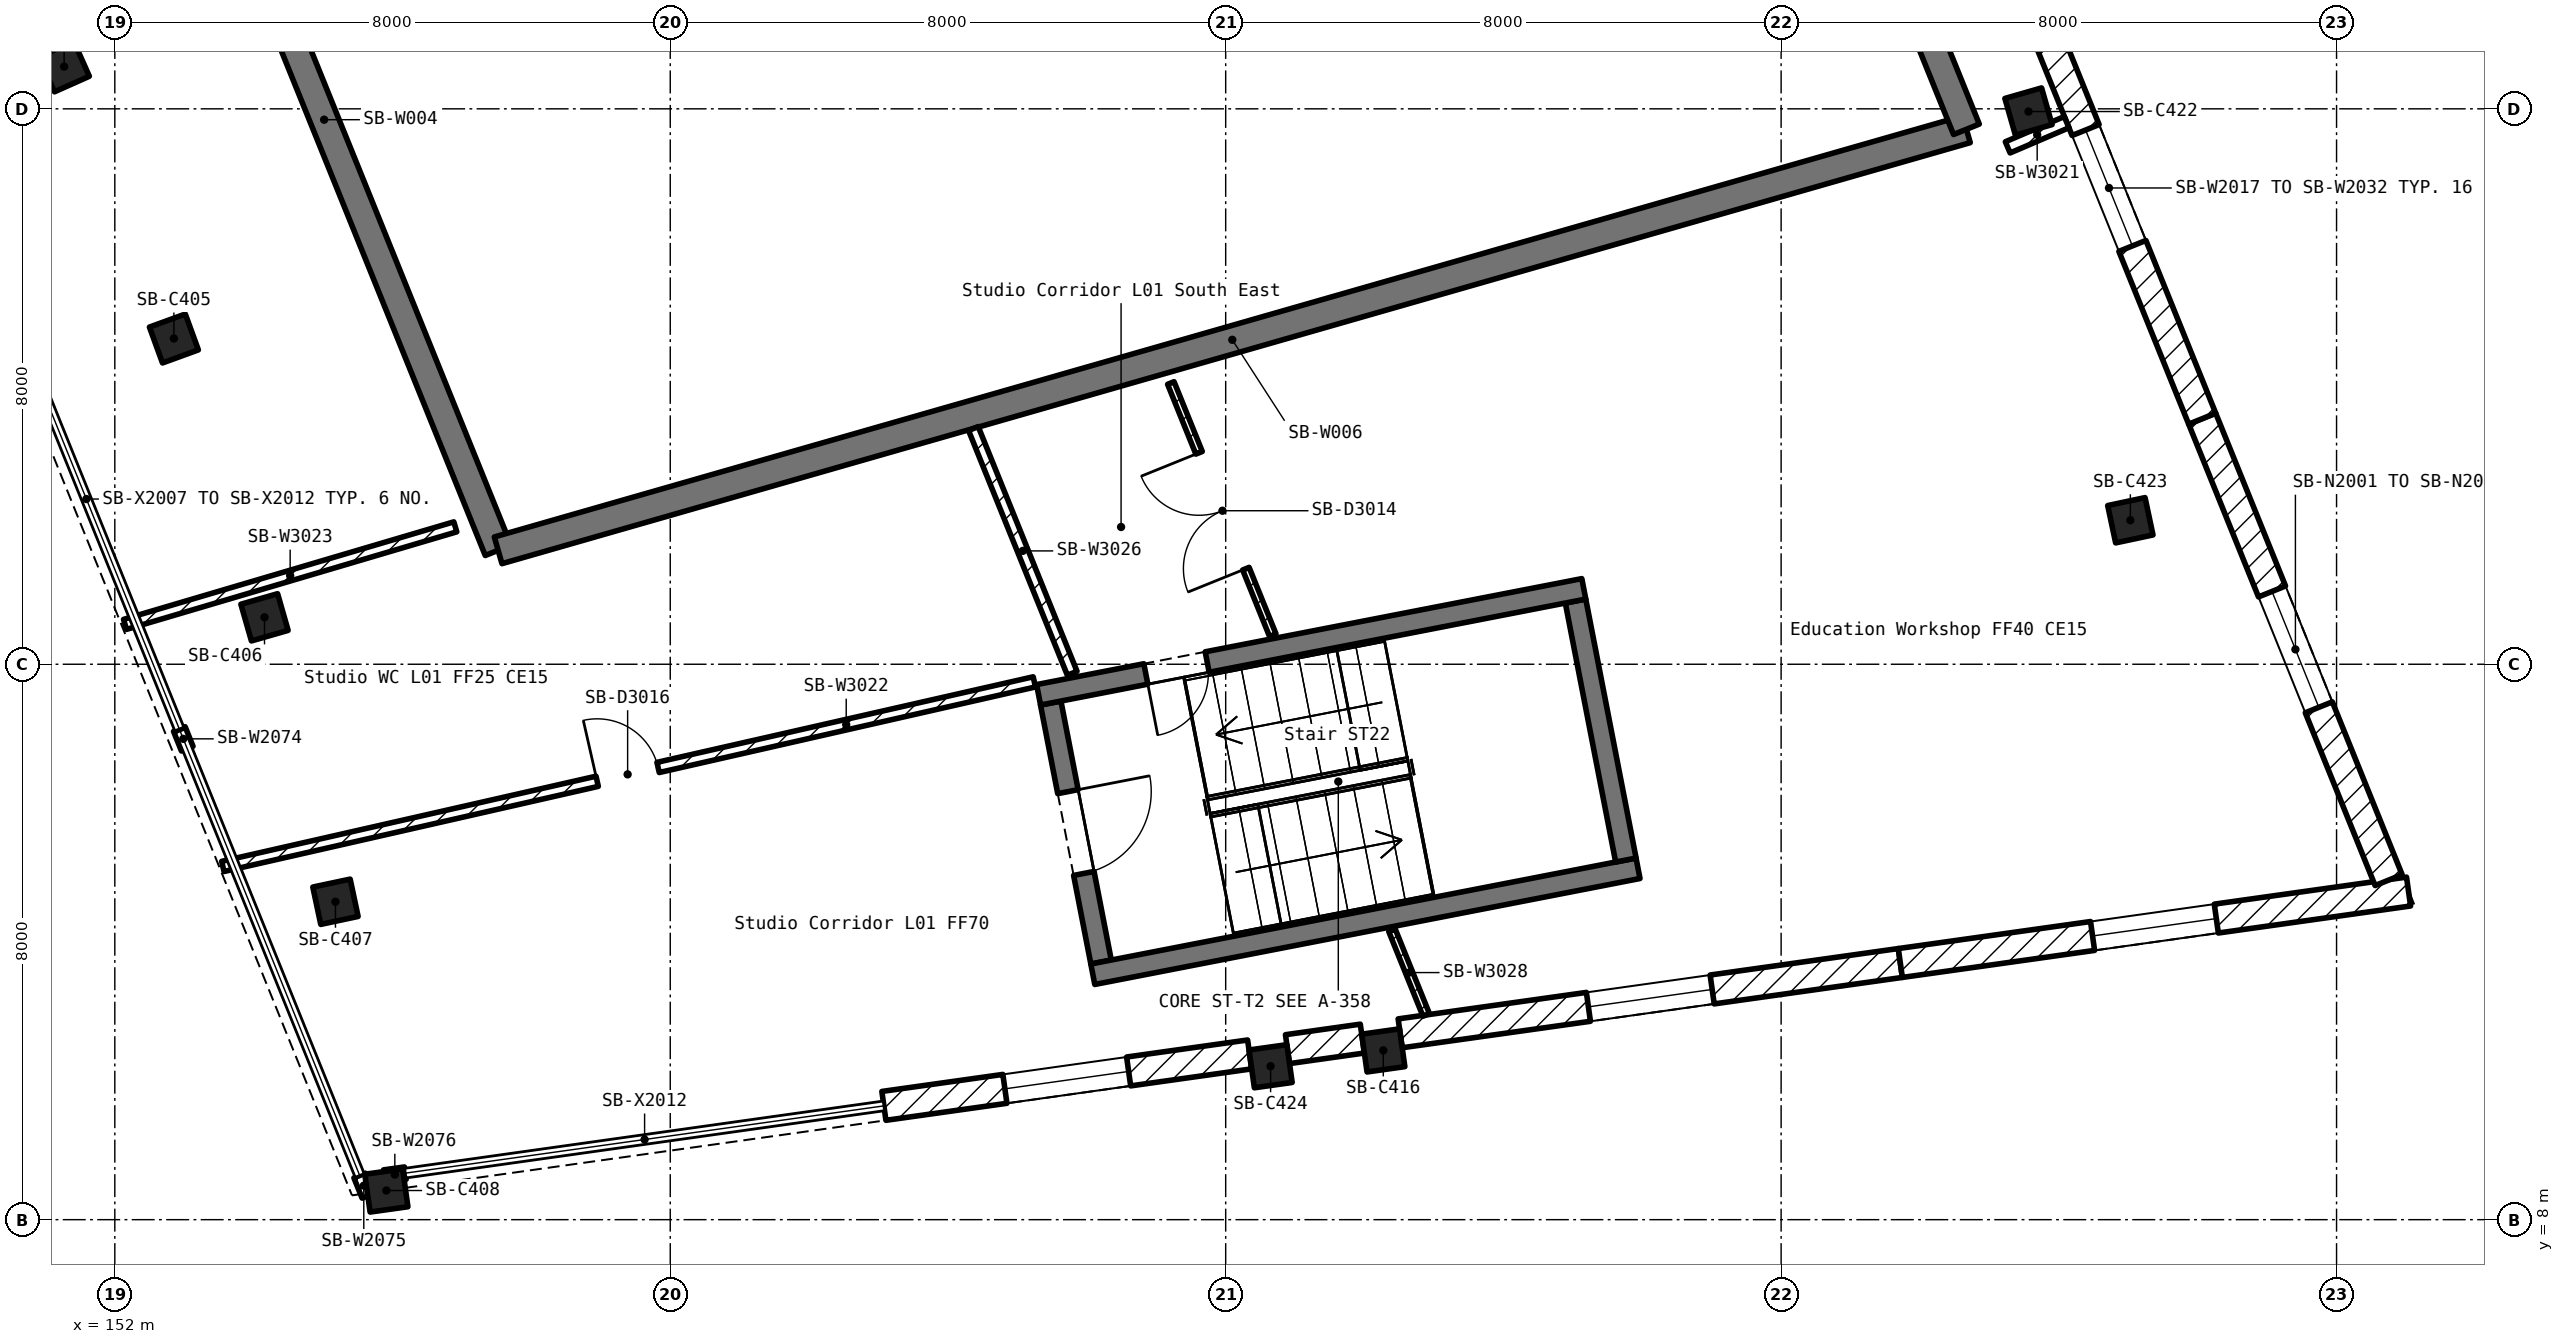
"""IFC4 building model, lengths in metres.
Left out: names, types, materials, properties, quantities, classifications, styles, units other than length and angle.
Written with IfcOpenShell. Run it as: python <this file> out.ifc"""

import sys

from ifc_helpers import new_model, si_unit, direction, frame, frame_2d, origin, origin_2d, place, context, subcontext, project, spatial, rectangle, extrude, element, fill, save


model = new_model("IFC4")
c1 = context("Model", 3, precision=1e-05, world=origin(), true_north=direction((0.0, 1.0)))
c2 = subcontext(c1, "Body", "Model", "MODEL_VIEW")
j1 = project(units=[si_unit("LENGTHUNIT", "METRE"), si_unit("PLANEANGLEUNIT", "RADIAN")], contexts=[c1])
p1 = place(None, origin())
s1 = spatial("IfcSite", under=j1, at=p1, CompositionType="ELEMENT")
p2 = place(p1, origin())
s2 = spatial("IfcBuilding", under=s1, at=p2, CompositionType="ELEMENT")
p3 = place(p2, frame((0.0, 0.0, 6.0)))
s3 = spatial("IfcBuildingStorey", under=s2, at=p3, CompositionType="ELEMENT", Elevation=6.0)
for number, where, z_axis, x_axis in (
    (1, (151.27, 24.608, 0.0), (0.0, 0.0, 1.0), (0.407, -0.914, 0.0)),
    (2, (152.851, 20.692, 0.0), (0.0, 0.0, 1.0), (0.342, -0.94, 0.0)),
    (3, (154.156, 16.676, 0.0), (0.0, 0.0, 1.0), (0.276, -0.961, 0.0)),
    (4, (155.178, 12.579, 0.0), (0.0, 0.0, 1.0), (0.208, -0.978, 0.0)),
    (5, (155.911, 8.42, 0.0), (0.0, 0.0, 1.0), (0.139, -0.99, 0.0)),
    (6, (170.27, 10.438, 0.0), (0.0, 0.0, 1.0), (0.139, -0.99, 0.0)),
    (7, (179.563, 23.961, 0.0), (0.0, 0.0, 1.0), (0.276, -0.961, 0.0)),
    (8, (181.03, 18.074, 0.0), (0.0, 0.0, 1.0), (0.208, -0.978, 0.0)),
    (9, (168.647, 10.21, 0.0), (0.0, 0.0, 1.0), (0.139, -0.99, 0.0)),
):
    element("IfcColumn", number, at=place(p3, frame(where, z_axis=z_axis, x_axis=x_axis)), inside=s3, PredefinedType="COLUMN", context=c2, shape_type="SweptSolid", body=[
        extrude(rectangle(XDim=0.55, YDim=0.55, at=origin_2d()), origin(), (0.0, 0.0, 1.0), 5.5),
    ])
p4 = place(p3, frame((152.509, 30.046, 0.0), z_axis=(0.0, 0.0, 1.0), x_axis=(0.374613299166, -0.92718114524, 0.0)))
e10 = element("IfcWall", 10, at=p4, inside=s3, PredefinedType="SHEAR", context=c2, shape_type="SweptSolid", body=[
    extrude(rectangle(XDim=13.379, YDim=0.4, at=frame_2d((6.689, 0.0))), origin(), (0.0, 0.0, 1.0), 5.5),
])
p5 = place(p3, frame((157.521, 17.641, 0.0), z_axis=(0.0, 0.0, 1.0), x_axis=(0.961263044958, 0.275632651182, 0.0)))
e11 = element("IfcWall", 11, at=p5, inside=s3, PredefinedType="SHEAR", context=c2, shape_type="SweptSolid", body=[
    extrude(rectangle(XDim=22.0, YDim=0.4, at=frame_2d((11.0, 0.0))), origin(), (0.0, 0.0, 1.0), 5.5),
])
p6 = place(p3, frame((178.669, 23.705, 0.0), z_axis=(0.0, 0.0, 1.0), x_axis=(-0.374642655757, 0.92716928362, 0.0)))
e12 = element("IfcWall", 12, at=p6, inside=s3, PredefinedType="SHEAR", context=c2, shape_type="SweptSolid", body=[
    extrude(rectangle(XDim=17.979, YDim=0.4, at=frame_2d((8.99, 0.0))), origin(), (0.0, 0.0, 1.0), 5.5),
])
p7 = place(p3, frame((163.077, 9.639, 0.0), z_axis=(0.0, 0.0, 1.0), x_axis=(0.990252820999, 0.139281551197, 0.0)))
e13 = element("IfcWall", 13, at=p7, inside=s3, PredefinedType="SOLIDWALL", context=c2, shape_type="SweptSolid", body=[
    extrude(rectangle(XDim=5.32, YDim=0.42, at=frame_2d((2.66, 0.0))), origin(), (0.0, 0.0, 1.0), 4.48),
])
p8 = place(p7, frame((1.76, 0.0, 1.0)))
e14 = element("IfcOpeningElement", 14, at=p8, cuts=e13, PredefinedType="OPENING", context=c2, shape_type="SweptSolid", body=[
    extrude(rectangle(XDim=1.8, YDim=1.5, at=frame_2d((0.9, 0.75))), frame((0.0, 0.222, 0.0), z_axis=(0.0, -1.0, 0.0), x_axis=(1.0, 0.0, 0.0)), (0.0, 0.0, 1.0), 0.444),
])
p9 = place(p3, frame((168.89, 10.456, 0.0), z_axis=(0.0, 0.0, 1.0), x_axis=(0.990225632743, 0.139474715481, 0.0)))
e15 = element("IfcWall", 15, at=p9, inside=s3, PredefinedType="SOLIDWALL", context=c2, shape_type="SweptSolid", body=[
    extrude(rectangle(XDim=1.089, YDim=0.42, at=frame_2d((0.544, 0.0))), origin(), (0.0, 0.0, 1.0), 4.48),
])
p10 = place(p3, frame((170.513, 10.684, 0.0), z_axis=(0.0, 0.0, 1.0), x_axis=(0.990259181758, 0.139236320493, 0.0)))
e16 = element("IfcWall", 16, at=p10, inside=s3, PredefinedType="SOLIDWALL", context=c2, shape_type="SweptSolid", body=[
    extrude(rectangle(XDim=7.275, YDim=0.42, at=frame_2d((3.637, 0.0))), origin(), (0.0, 0.0, 1.0), 5.28),
])
p11 = place(p10, frame((2.738, 0.0, 1.0)))
e17 = element("IfcOpeningElement", 17, at=p11, cuts=e16, PredefinedType="OPENING", context=c2, shape_type="SweptSolid", body=[
    extrude(rectangle(XDim=1.8, YDim=1.5, at=frame_2d((0.9, 0.75))), frame((0.0, 0.222, 0.0), z_axis=(0.0, -1.0, 0.0), x_axis=(1.0, 0.0, 0.0)), (0.0, 0.0, 1.0), 0.444),
])
p12 = place(p3, frame((177.717, 11.697, 0.0), z_axis=(0.0, 0.0, 1.0), x_axis=(0.990262769028, 0.139210805171, 0.0)))
e18 = element("IfcWall", 18, at=p12, inside=s3, PredefinedType="SOLIDWALL", context=c2, shape_type="SweptSolid", body=[
    extrude(rectangle(XDim=7.392, YDim=0.42, at=frame_2d((3.696, 0.0))), origin(), (0.0, 0.0, 1.0), 5.28),
])
p13 = place(p12, frame((2.796, 0.0, 1.0)))
e19 = element("IfcOpeningElement", 19, at=p13, cuts=e18, PredefinedType="OPENING", context=c2, shape_type="SweptSolid", body=[
    extrude(rectangle(XDim=1.8, YDim=1.5, at=frame_2d((0.9, 0.75))), frame((0.0, 0.222, 0.0), z_axis=(0.0, -1.0, 0.0), x_axis=(1.0, 0.0, 0.0)), (0.0, 0.0, 1.0), 0.444),
])
p14 = place(p3, frame((184.75, 12.891, 0.0), z_axis=(0.0, 0.0, 1.0), x_axis=(-0.374594824941, 0.927188609252, 0.0)))
e20 = element("IfcWall", 20, at=p14, inside=s3, PredefinedType="SOLIDWALL", context=c2, shape_type="SweptSolid", body=[
    extrude(rectangle(XDim=7.168, YDim=0.42, at=frame_2d((3.584, 0.0))), origin(), (0.0, 0.0, 1.0), 5.28),
])
p15 = place(p14, frame((2.684, 0.0, 1.0)))
e21 = element("IfcOpeningElement", 21, at=p15, cuts=e20, PredefinedType="OPENING", context=c2, shape_type="SweptSolid", body=[
    extrude(rectangle(XDim=1.8, YDim=1.5, at=frame_2d((0.9, 0.75))), frame((0.0, 0.222, 0.0), z_axis=(0.0, -1.0, 0.0), x_axis=(1.0, 0.0, 0.0)), (0.0, 0.0, 1.0), 0.444),
])
p16 = place(p3, frame((182.065, 19.537, 0.0), z_axis=(0.0, 0.0, 1.0), x_axis=(-0.374594824941, 0.927188609252, 0.0)))
e22 = element("IfcWall", 22, at=p16, inside=s3, PredefinedType="SOLIDWALL", context=c2, shape_type="SweptSolid", body=[
    extrude(rectangle(XDim=7.168, YDim=0.42, at=frame_2d((3.584, 0.0))), origin(), (0.0, 0.0, 1.0), 5.28),
])
p17 = place(p16, frame((2.684, 0.0, 1.0)))
e23 = element("IfcOpeningElement", 23, at=p17, cuts=e22, PredefinedType="OPENING", context=c2, shape_type="SweptSolid", body=[
    extrude(rectangle(XDim=1.8, YDim=1.5, at=frame_2d((0.9, 0.75))), frame((0.0, 0.222, 0.0), z_axis=(0.0, -1.0, 0.0), x_axis=(1.0, 0.0, 0.0)), (0.0, 0.0, 1.0), 0.444),
])
p18 = place(p3, frame((165.48, 15.441, 0.0), z_axis=(0.0, 0.0, 1.0), x_axis=(0.190824946063, -0.981624082814, 0.0)))
e24 = element("IfcWall", 24, at=p18, inside=s3, PredefinedType="SOLIDWALL", context=c2, shape_type="SweptSolid", body=[
    extrude(rectangle(XDim=3.8, YDim=0.3, at=frame_2d((1.9, 0.0))), origin(), (0.0, 0.0, 1.0), 5.5),
])
p19 = place(p18, frame((1.3, 0.0, 0.0)))
e25 = element("IfcOpeningElement", 25, at=p19, cuts=e24, PredefinedType="OPENING", context=c2, shape_type="SweptSolid", body=[
    extrude(rectangle(XDim=1.2, YDim=2.1, at=frame_2d((0.6, 1.05))), frame((0.0, 0.162, 0.0), z_axis=(0.0, -1.0, 0.0), x_axis=(1.0, 0.0, 0.0)), (0.0, 0.0, 1.0), 0.324),
])
p20 = place(p3, frame((166.086, 11.535, 0.0), z_axis=(0.0, 0.0, 1.0), x_axis=(0.981635396686, 0.190766737073, 0.0)))
e26 = element("IfcWall", 26, at=p20, inside=s3, PredefinedType="SOLIDWALL", context=c2, shape_type="SweptSolid", body=[
    extrude(rectangle(XDim=8.0, YDim=0.3, at=frame_2d((4.0, 0.0))), origin(), (0.0, 0.0, 1.0), 5.5),
])
p21 = place(p3, frame((173.764, 13.18, 0.0), z_axis=(0.0, 0.0, 1.0), x_axis=(-0.190763033741, 0.981636116368, 0.0)))
e27 = element("IfcWall", 27, at=p21, inside=s3, PredefinedType="SOLIDWALL", context=c2, shape_type="SweptSolid", body=[
    extrude(rectangle(XDim=3.8, YDim=0.3, at=frame_2d((1.9, 0.0))), origin(), (0.0, 0.0, 1.0), 5.5),
])
p22 = place(p3, frame((173.158, 17.086, 0.0), z_axis=(0.0, 0.0, 1.0), x_axis=(-0.981641111144, -0.190737329623, 0.0)))
e28 = element("IfcWall", 28, at=p22, inside=s3, PredefinedType="SOLIDWALL", context=c2, shape_type="SweptSolid", body=[
    extrude(rectangle(XDim=8.0, YDim=0.3, at=frame_2d((4.0, 0.0))), origin(), (0.0, 0.0, 1.0), 5.5),
])
p23 = place(p22, frame((5.526, 0.0, 0.0)))
e29 = element("IfcOpeningElement", 29, at=p23, cuts=e28, PredefinedType="OPENING", context=c2, shape_type="SweptSolid", body=[
    extrude(rectangle(XDim=0.9, YDim=2.1, at=frame_2d((0.45, 1.05))), frame((0.0, 0.162, 0.0), z_axis=(0.0, -1.0, 0.0), x_axis=(1.0, 0.0, 0.0)), (0.0, 0.0, 1.0), 0.324),
])
p24 = place(p3, frame((180.112, 23.808, 0.0), z_axis=(0.0, 0.0, 1.0), x_axis=(-0.919322876767, -0.393504063832, 0.0)))
e30 = element("IfcWall", 30, at=p24, inside=s3, PredefinedType="PARTITIONING", context=c2, shape_type="SweptSolid", body=[
    extrude(rectangle(XDim=0.923, YDim=0.175, at=frame_2d((0.461, 0.0))), origin(), (0.0, 0.0, 1.0), 4.38),
])
p25 = place(p3, frame((153.556, 13.088, 0.0), z_axis=(0.0, 0.0, 1.0), x_axis=(0.975099631728, 0.221767238799, 0.0)))
e31 = element("IfcWall", 31, at=p25, inside=s3, PredefinedType="PARTITIONING", context=c2, shape_type="SweptSolid", body=[
    extrude(rectangle(XDim=11.987, YDim=0.15, at=frame_2d((5.993, 0.0))), origin(), (0.0, 0.0, 1.0), 4.38),
])
p26 = place(p25, frame((5.529, 0.0, 0.0)))
e32 = element("IfcOpeningElement", 32, at=p26, cuts=e31, PredefinedType="OPENING", context=c2, shape_type="SweptSolid", body=[
    extrude(rectangle(XDim=0.9, YDim=2.1, at=frame_2d((0.45, 1.05))), frame((0.0, 0.087, 0.0), z_axis=(0.0, -1.0, 0.0), x_axis=(1.0, 0.0, 0.0)), (0.0, 0.0, 1.0), 0.174),
])
p27 = place(p3, frame((156.904, 17.979, 0.0), z_axis=(0.0, 0.0, 1.0), x_axis=(-0.959043541429, -0.283258690322, 0.0)))
e33 = element("IfcWall", 33, at=p27, inside=s3, PredefinedType="PARTITIONING", context=c2, shape_type="SweptSolid", body=[
    extrude(rectangle(XDim=4.96, YDim=0.15, at=frame_2d((2.48, 0.0))), origin(), (0.0, 0.0, 1.0), 4.38),
])
p28 = place(p3, frame((165.789, 15.87, 0.0), z_axis=(0.0, 0.0, 1.0), x_axis=(-0.374367475924, 0.927280428441, 0.0)))
e34 = element("IfcWall", 34, at=p28, inside=s3, PredefinedType="PARTITIONING", context=c2, shape_type="SweptSolid", body=[
    extrude(rectangle(XDim=3.801, YDim=0.15, at=frame_2d((1.901, 0.0))), origin(), (0.0, 0.0, 1.0), 4.38),
])
p29 = place(p3, frame((168.678, 16.419, 0.0), z_axis=(0.0, 0.0, 1.0), x_axis=(-0.374729910149, 0.927134021833, 0.0)))
e35 = element("IfcWall", 35, at=p29, inside=s3, PredefinedType="PARTITIONING", context=c2, shape_type="SweptSolid", body=[
    extrude(rectangle(XDim=3.917, YDim=0.1, at=frame_2d((1.959, 0.0))), origin(), (0.0, 0.0, 1.0), 4.38),
])
p30 = place(p29, frame((1.033, 0.0, 0.0)))
e36 = element("IfcOpeningElement", 36, at=p30, cuts=e35, PredefinedType="OPENING", context=c2, shape_type="SweptSolid", body=[
    extrude(rectangle(XDim=1.8, YDim=2.1, at=frame_2d((0.9, 1.05))), frame((0.0, 0.062, 0.0), z_axis=(0.0, -1.0, 0.0), x_axis=(1.0, 0.0, 0.0)), (0.0, 0.0, 1.0), 0.124),
])
p31 = place(p3, frame((170.888, 10.949, 0.0), z_axis=(0.0, 0.0, 1.0), x_axis=(-0.374619505571, 0.927178637613, 0.0)))
e37 = element("IfcWall", 37, at=p31, inside=s3, PredefinedType="PARTITIONING", context=c2, shape_type="SweptSolid", body=[
    extrude(rectangle(XDim=1.316, YDim=0.1, at=frame_2d((0.658, 0.0))), origin(), (0.0, 0.0, 1.0), 4.38),
])
p32 = place(p3, frame((152.929, 15.067, 0.0), z_axis=(0.0, 0.0, 1.0), x_axis=(0.373735167079, -0.927535457483, 0.0)))
e38 = element("IfcWall", 38, at=p32, inside=s3, PredefinedType="SOLIDWALL", context=c2, shape_type="SweptSolid", body=[
    extrude(rectangle(XDim=0.305, YDim=0.18, at=frame_2d((0.153, 0.0))), origin(), (0.0, 0.0, 1.0), 4.43),
])
p33 = place(p3, frame((155.527, 8.636, 0.0), z_axis=(0.0, 0.0, 1.0), x_axis=(0.374463049601, -0.927241837108, 0.0)))
e39 = element("IfcWall", 39, at=p33, inside=s3, PredefinedType="SOLIDWALL", context=c2, shape_type="SweptSolid", body=[
    extrude(rectangle(XDim=0.315, YDim=0.18, at=frame_2d((0.157, 0.0))), origin(), (0.0, 0.0, 1.0), 4.43),
])
p34 = place(p3, frame((156.184, 8.67, 0.0), z_axis=(0.0, 0.0, 1.0), x_axis=(-0.99047104668, -0.137721115626, 0.0)))
e40 = element("IfcWall", 40, at=p34, inside=s3, PredefinedType="SOLIDWALL", context=c2, shape_type="SweptSolid", body=[
    extrude(rectangle(XDim=0.305, YDim=0.18, at=frame_2d((0.152, 0.0))), origin(), (0.0, 0.0, 1.0), 3.63),
])
p35 = place(p8, origin())
e41 = element("IfcWindow", 41, at=p35, inside=s3, PartitioningType="DOUBLE_PANEL_VERTICAL", PredefinedType="WINDOW", context=c2, shape_type="SweptSolid", body=[
    extrude(rectangle(XDim=1.8, YDim=1.5, at=frame_2d((0.9, 0.75))), frame((0.0, 0.03, 0.0), z_axis=(0.0, -1.0, 0.0), x_axis=(1.0, 0.0, 0.0)), (0.0, 0.0, 1.0), 0.06),
])
fill(e14, e41)
p36 = place(p11, origin())
e42 = element("IfcWindow", 42, at=p36, inside=s3, PartitioningType="DOUBLE_PANEL_VERTICAL", PredefinedType="WINDOW", context=c2, shape_type="SweptSolid", body=[
    extrude(rectangle(XDim=1.8, YDim=1.5, at=frame_2d((0.9, 0.75))), frame((0.0, 0.03, 0.0), z_axis=(0.0, -1.0, 0.0), x_axis=(1.0, 0.0, 0.0)), (0.0, 0.0, 1.0), 0.06),
])
fill(e17, e42)
p37 = place(p13, origin())
e43 = element("IfcWindow", 43, at=p37, inside=s3, PartitioningType="DOUBLE_PANEL_VERTICAL", PredefinedType="WINDOW", context=c2, shape_type="SweptSolid", body=[
    extrude(rectangle(XDim=1.8, YDim=1.5, at=frame_2d((0.9, 0.75))), frame((0.0, 0.03, 0.0), z_axis=(0.0, -1.0, 0.0), x_axis=(1.0, 0.0, 0.0)), (0.0, 0.0, 1.0), 0.06),
])
fill(e19, e43)
p38 = place(p15, origin())
e44 = element("IfcWindow", 44, at=p38, inside=s3, PartitioningType="DOUBLE_PANEL_VERTICAL", PredefinedType="WINDOW", context=c2, shape_type="SweptSolid", body=[
    extrude(rectangle(XDim=1.8, YDim=1.5, at=frame_2d((0.9, 0.75))), frame((0.0, 0.03, 0.0), z_axis=(0.0, -1.0, 0.0), x_axis=(1.0, 0.0, 0.0)), (0.0, 0.0, 1.0), 0.06),
])
fill(e21, e44)
p39 = place(p17, origin())
e45 = element("IfcWindow", 45, at=p39, inside=s3, PartitioningType="DOUBLE_PANEL_VERTICAL", PredefinedType="WINDOW", context=c2, shape_type="SweptSolid", body=[
    extrude(rectangle(XDim=1.8, YDim=1.5, at=frame_2d((0.9, 0.75))), frame((0.0, 0.03, 0.0), z_axis=(0.0, -1.0, 0.0), x_axis=(1.0, 0.0, 0.0)), (0.0, 0.0, 1.0), 0.06),
])
fill(e23, e45)
p40 = place(p19, origin())
e46 = element("IfcDoor", 46, at=p40, inside=s3, OperationType="SINGLE_SWING_LEFT", PredefinedType="DOOR", context=c2, shape_type="SweptSolid", body=[
    extrude(rectangle(XDim=1.2, YDim=2.1, at=frame_2d((0.6, 1.05))), frame((0.0, 0.025, 0.0), z_axis=(0.0, -1.0, 0.0), x_axis=(1.0, 0.0, 0.0)), (0.0, 0.0, 1.0), 0.05),
])
fill(e25, e46)
p41 = place(p30, origin())
e47 = element("IfcDoor", 47, at=p41, inside=s3, OperationType="DOUBLE_DOOR_SINGLE_SWING", PredefinedType="DOOR", context=c2, shape_type="SweptSolid", body=[
    extrude(rectangle(XDim=1.8, YDim=2.1, at=frame_2d((0.9, 1.05))), frame((0.0, 0.025, 0.0), z_axis=(0.0, -1.0, 0.0), x_axis=(1.0, 0.0, 0.0)), (0.0, 0.0, 1.0), 0.05),
])
fill(e36, e47)
p42 = place(p23, origin())
e48 = element("IfcDoor", 48, at=p42, inside=s3, OperationType="SINGLE_SWING_RIGHT", PredefinedType="DOOR", context=c2, shape_type="SweptSolid", body=[
    extrude(rectangle(XDim=0.9, YDim=2.1, at=frame_2d((0.45, 1.05))), frame((0.0, 0.025, 0.0), z_axis=(0.0, -1.0, 0.0), x_axis=(1.0, 0.0, 0.0)), (0.0, 0.0, 1.0), 0.05),
])
fill(e29, e48)
p43 = place(p26, origin())
e49 = element("IfcDoor", 49, at=p43, inside=s3, OperationType="SINGLE_SWING_LEFT", PredefinedType="DOOR", context=c2, shape_type="SweptSolid", body=[
    extrude(rectangle(XDim=0.9, YDim=2.1, at=frame_2d((0.45, 1.05))), frame((0.0, 0.025, 0.0), z_axis=(0.0, -1.0, 0.0), x_axis=(1.0, 0.0, 0.0)), (0.0, 0.0, 1.0), 0.05),
])
fill(e32, e49)
save(model, sys.argv[1])
